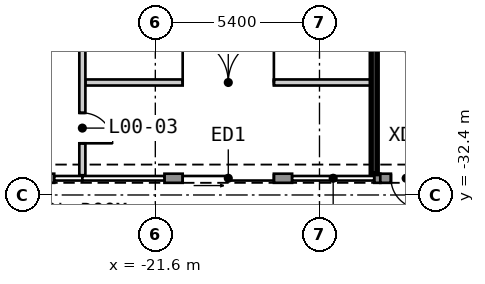
"""IFC4 building model, lengths in metres.
Left out: names, types, materials, properties, quantities, classifications, styles, units other than length and angle.
Written with IfcOpenShell. Run it as: python <this file> out.ifc"""

import sys

from ifc_helpers import new_model, si_unit, direction, frame, frame_2d, origin, place, context, subcontext, project, spatial, rectangle, extrude, element, fill, save


model = new_model("IFC4")
c1 = context("Model", 3, precision=1e-05, world=origin(), true_north=direction((0.0, 1.0)))
c2 = subcontext(c1, "Body", "Model", "MODEL_VIEW")
j1 = project(units=[si_unit("LENGTHUNIT", "METRE"), si_unit("PLANEANGLEUNIT", "RADIAN")], contexts=[c1])
p1 = place(None, origin())
s1 = spatial("IfcSite", under=j1, at=p1, CompositionType="ELEMENT")
p2 = place(p1, origin())
s2 = spatial("IfcBuilding", under=s1, at=p2, CompositionType="ELEMENT")
p3 = place(p2, origin())
s3 = spatial("IfcBuildingStorey", under=s2, at=p3, CompositionType="ELEMENT", Elevation=0.0)
p4 = place(p3, frame((-26.625, -31.85, 0.0), z_axis=(0.0, 0.0, 1.0), x_axis=(1.0, 0.0, 0.0)))
e1 = element("IfcWall", 1, at=p4, inside=s3, PredefinedType="SOLIDWALL", context=c2, shape_type="SweptSolid", body=[
    extrude(rectangle(XDim=1.7, YDim=0.3, at=frame_2d((0.85, 0.0))), origin(), (0.0, 0.0, 1.0), 4.55),
])
p5 = place(p4, frame((1.35, 0.0, 0.0), z_axis=(0.0, 0.0, 1.0), x_axis=(-1.0, 0.0, 0.0)))
e2 = element("IfcOpeningElement", 2, at=p5, cuts=e1, PredefinedType="OPENING", context=c2, shape_type="SweptSolid", body=[
    extrude(rectangle(XDim=1.0, YDim=2.4, at=frame_2d((0.5, 1.2))), frame((0.0, 0.16, 0.0), z_axis=(0.0, -1.0, 0.0), x_axis=(1.0, 0.0, 0.0)), (0.0, 0.0, 1.0), 0.32),
])
p6 = place(p3, frame((-21.3, -31.85, 0.0), z_axis=(0.0, 0.0, 1.0), x_axis=(1.0, 0.0, 0.0)))
e3 = element("IfcWall", 3, at=p6, inside=s3, PredefinedType="SOLIDWALL", context=c2, shape_type="SweptSolid", body=[
    extrude(rectangle(XDim=4.2, YDim=0.3, at=frame_2d((2.1, 0.0))), origin(), (0.0, 0.0, 1.0), 4.55),
])
p7 = place(p6, frame((0.6, 0.0, 0.0)))
e4 = element("IfcOpeningElement", 4, at=p7, cuts=e3, PredefinedType="OPENING", context=c2, shape_type="SweptSolid", body=[
    extrude(rectangle(XDim=3.0, YDim=2.4, at=frame_2d((1.5, 1.2))), frame((0.0, 0.16, 0.0), z_axis=(0.0, -1.0, 0.0), x_axis=(1.0, 0.0, 0.0)), (0.0, 0.0, 1.0), 0.32),
])
p8 = place(p3, frame((-14.4, -31.85, 0.0), z_axis=(0.0, 0.0, 1.0), x_axis=(1.0, 0.0, 0.0)))
e5 = element("IfcWall", 5, at=p8, inside=s3, PredefinedType="SOLIDWALL", context=c2, shape_type="SweptSolid", body=[
    extrude(rectangle(XDim=0.2, YDim=0.3, at=frame_2d((0.1, 0.0))), origin(), (0.0, 0.0, 1.0), 4.55),
])
p9 = place(p3, frame((-14.2, -31.85, 0.0), z_axis=(0.0, 0.0, 1.0), x_axis=(1.0, 0.0, 0.0)))
e6 = element("IfcWall", 6, at=p9, inside=s3, PredefinedType="SOLIDWALL", context=c2, shape_type="SweptSolid", body=[
    extrude(rectangle(XDim=1.7, YDim=0.3, at=frame_2d((0.85, 0.0))), origin(), (0.0, 0.0, 1.0), 4.55),
])
p10 = place(p9, frame((1.35, 0.0, 0.0), z_axis=(0.0, 0.0, 1.0), x_axis=(-1.0, 0.0, 0.0)))
e7 = element("IfcOpeningElement", 7, at=p10, cuts=e6, PredefinedType="OPENING", context=c2, shape_type="SweptSolid", body=[
    extrude(rectangle(XDim=1.0, YDim=2.4, at=frame_2d((0.5, 1.2))), frame((0.0, 0.16, 0.0), z_axis=(0.0, -1.0, 0.0), x_axis=(1.0, 0.0, 0.0)), (0.0, 0.0, 1.0), 0.32),
])
p11 = place(p3, frame((-23.9, -28.7, 0.0), z_axis=(0.0, 0.0, 1.0), x_axis=(1.0, 0.0, 0.0)))
e8 = element("IfcWall", 8, at=p11, inside=s3, PredefinedType="PARTITIONING", context=c2, shape_type="SweptSolid", body=[
    extrude(rectangle(XDim=9.4, YDim=0.2, at=frame_2d((4.7, 0.0))), origin(), (0.0, 0.0, 1.0), 4.55),
])
p12 = place(p11, frame((3.2, 0.0, 0.0)))
e9 = element("IfcOpeningElement", 9, at=p12, cuts=e8, PredefinedType="OPENING", context=c2, shape_type="SweptSolid", body=[
    extrude(rectangle(XDim=3.0, YDim=2.1, at=frame_2d((1.5, 1.05))), frame((0.0, 0.11, 0.0), z_axis=(0.0, -1.0, 0.0), x_axis=(1.0, 0.0, 0.0)), (0.0, 0.0, 1.0), 0.22),
])
p13 = place(p3, frame((-24.0, -31.75, 0.0), z_axis=(0.0, 0.0, 1.0), x_axis=(0.0, 1.0, 0.0)))
e10 = element("IfcWall", 10, at=p13, inside=s3, PredefinedType="SOLIDWALL", context=c2, shape_type="SweptSolid", body=[
    extrude(rectangle(XDim=18.346, YDim=0.2, at=frame_2d((9.173, 0.0))), origin(), (0.0, 0.0, 1.0), 4.55),
])
p14 = place(p13, frame((2.05, 0.0, 0.0), z_axis=(0.0, 0.0, 1.0), x_axis=(-1.0, 0.0, 0.0)))
e11 = element("IfcOpeningElement", 11, at=p14, cuts=e10, PredefinedType="OPENING", context=c2, shape_type="SweptSolid", body=[
    extrude(rectangle(XDim=1.0, YDim=2.1, at=frame_2d((0.5, 1.05))), frame((0.0, 0.11, 0.0), z_axis=(0.0, -1.0, 0.0), x_axis=(1.0, 0.0, 0.0)), (0.0, 0.0, 1.0), 0.22),
])
p15 = place(p13, frame((8.35, 0.0, 0.0)))
e12 = element("IfcOpeningElement", 12, at=p15, cuts=e10, PredefinedType="OPENING", context=c2, shape_type="SweptSolid", body=[
    extrude(rectangle(XDim=1.8, YDim=2.1, at=frame_2d((0.9, 1.05))), frame((0.0, 0.11, 0.0), z_axis=(0.0, -1.0, 0.0), x_axis=(1.0, 0.0, 0.0)), (0.0, 0.0, 1.0), 0.22),
])
p16 = place(p3, frame((-14.4, -31.7, 0.0), z_axis=(0.0, 0.0, 1.0), x_axis=(0.0, 1.0, 0.0)))
e13 = element("IfcWall", 13, at=p16, inside=s3, PredefinedType="SOLIDWALL", context=c2, shape_type="SweptSolid", body=[
    extrude(rectangle(XDim=5.143, YDim=0.2, at=frame_2d((2.572, 0.0))), origin(), (0.0, 0.0, 1.0), 4.55),
])
p17 = place(p7, origin())
e14 = element("IfcDoor", 14, at=p17, inside=s3, OperationType="DOUBLE_DOOR_SLIDING", PredefinedType="DOOR", context=c2, shape_type="SweptSolid", body=[
    extrude(rectangle(XDim=3.0, YDim=2.4, at=frame_2d((1.5, 1.2))), frame((0.0, 0.025, 0.0), z_axis=(0.0, -1.0, 0.0), x_axis=(1.0, 0.0, 0.0)), (0.0, 0.0, 1.0), 0.05),
])
fill(e4, e14)
p18 = place(p10, origin())
e15 = element("IfcDoor", 15, at=p18, inside=s3, OperationType="SINGLE_SWING_RIGHT", PredefinedType="DOOR", context=c2, shape_type="SweptSolid", body=[
    extrude(rectangle(XDim=1.0, YDim=2.4, at=frame_2d((0.5, 1.2))), frame((0.0, 0.025, 0.0), z_axis=(0.0, -1.0, 0.0), x_axis=(1.0, 0.0, 0.0)), (0.0, 0.0, 1.0), 0.05),
])
fill(e7, e15)
p19 = place(p12, origin())
e16 = element("IfcDoor", 16, at=p19, inside=s3, OperationType="DOUBLE_DOOR_SINGLE_SWING", PredefinedType="DOOR", context=c2, shape_type="SweptSolid", body=[
    extrude(rectangle(XDim=3.0, YDim=2.1, at=frame_2d((1.5, 1.05))), frame((0.0, 0.025, 0.0), z_axis=(0.0, -1.0, 0.0), x_axis=(1.0, 0.0, 0.0)), (0.0, 0.0, 1.0), 0.05),
])
fill(e9, e16)
p20 = place(p14, origin())
e17 = element("IfcDoor", 17, at=p20, inside=s3, OperationType="SINGLE_SWING_RIGHT", PredefinedType="DOOR", context=c2, shape_type="SweptSolid", body=[
    extrude(rectangle(XDim=1.0, YDim=2.1, at=frame_2d((0.5, 1.05))), frame((0.0, 0.025, 0.0), z_axis=(0.0, -1.0, 0.0), x_axis=(1.0, 0.0, 0.0)), (0.0, 0.0, 1.0), 0.05),
])
fill(e11, e17)
save(model, sys.argv[1])
